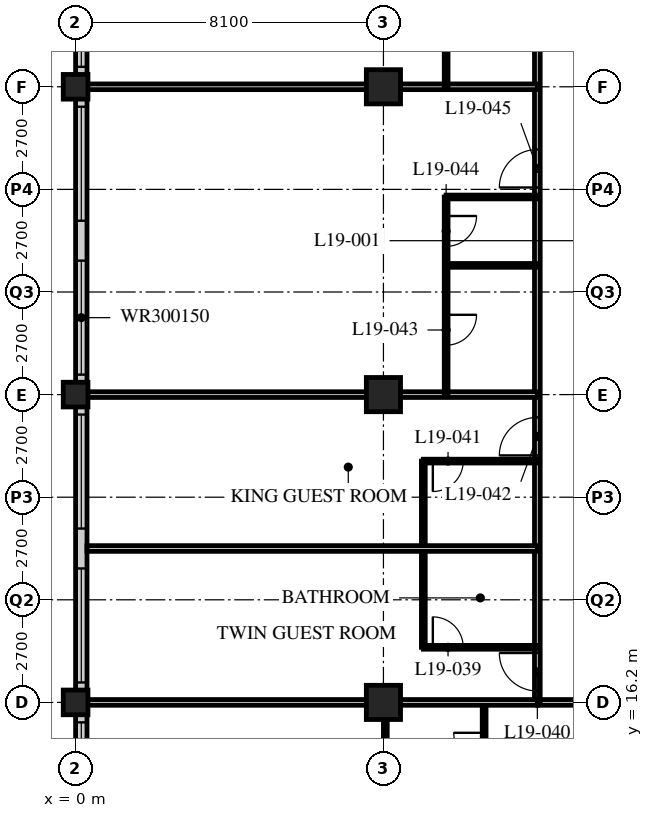
"""IFC4 building model, lengths in metres.
Left out: names, types, materials, properties, quantities, classifications, styles, units other than length and angle.
Written with IfcOpenShell. Run it as: python <this file> out.ifc"""

import sys

from ifc_helpers import new_model, si_unit, direction, frame, frame_2d, origin, origin_2d, place, context, subcontext, project, spatial, rectangle, hollow_rectangle, extrude, element, fill, save


model = new_model("IFC4")
c1 = context("Model", 3, precision=1e-05, world=origin(), true_north=direction((0.0, 1.0)))
c2 = subcontext(c1, "Body", "Model", "MODEL_VIEW")
j1 = project(units=[si_unit("LENGTHUNIT", "METRE"), si_unit("PLANEANGLEUNIT", "RADIAN")], contexts=[c1])
p1 = place(None, origin())
s1 = spatial("IfcSite", under=j1, at=p1, CompositionType="ELEMENT")
p2 = place(p1, origin())
s2 = spatial("IfcBuilding", under=s1, at=p2, CompositionType="ELEMENT")
p3 = place(p2, frame((0.0, 0.0, 77.2)))
s3 = spatial("IfcBuildingStorey", under=s2, at=p3, CompositionType="ELEMENT", Elevation=77.2)
for number, where, z_axis, x_axis in (
    (1, (0.0, 16.2, 0.0), (0.0, 0.0, 1.0), (1.0, 0.0, 0.0)),
    (2, (0.0, 24.3, 0.0), (0.0, 0.0, 1.0), (1.0, 0.0, 0.0)),
    (3, (0.0, 32.4, 0.0), (0.0, 0.0, 1.0), (1.0, 0.0, 0.0)),
):
    element("IfcColumn", number, at=place(p3, frame(where, z_axis=z_axis, x_axis=x_axis)), inside=s3, PredefinedType="COLUMN", context=c2, shape_type="SweptSolid", body=[
        extrude(hollow_rectangle(XDim=0.65, YDim=0.65, WallThickness=0.05, at=origin_2d()), origin(), (0.0, 0.0, 1.0), 3.4),
    ])
for number, where, z_axis, x_axis in (
    (4, (8.1, 16.2, 0.0), (0.0, 0.0, 1.0), (1.0, 0.0, 0.0)),
    (5, (8.1, 24.3, 0.0), (0.0, 0.0, 1.0), (1.0, 0.0, 0.0)),
    (6, (8.1, 32.4, 0.0), (0.0, 0.0, 1.0), (1.0, 0.0, 0.0)),
):
    element("IfcColumn", number, at=place(p3, frame(where, z_axis=z_axis, x_axis=x_axis)), inside=s3, PredefinedType="COLUMN", context=c2, shape_type="SweptSolid", body=[
        extrude(hollow_rectangle(XDim=0.9, YDim=0.9, WallThickness=0.09, at=origin_2d()), origin(), (0.0, 0.0, 1.0), 3.4),
    ])
p4 = place(p3, frame((0.15, 40.2, 0.0), z_axis=(0.0, 0.0, 1.0), x_axis=(0.0, -1.0, 0.0)))
e7 = element("IfcWall", 7, at=p4, inside=s3, PredefinedType="SOLIDWALL", context=c2, shape_type="SweptSolid", body=[
    extrude(rectangle(XDim=32.1, YDim=0.3, at=frame_2d((16.05, 0.0))), origin(), (0.0, 0.0, 1.0), 3.19),
])
p5 = place(p4, frame((0.225, 0.0, 0.9)))
e8 = element("IfcOpeningElement", 8, at=p5, cuts=e7, PredefinedType="OPENING", context=c2, shape_type="SweptSolid", body=[
    extrude(rectangle(XDim=3.0, YDim=1.5, at=frame_2d((1.5, 0.75))), frame((0.0, 0.16, 0.0), z_axis=(0.0, -1.0, 0.0), x_axis=(1.0, 0.0, 0.0)), (0.0, 0.0, 1.0), 0.32),
])
p6 = place(p4, frame((4.275, 0.0, 0.9)))
e9 = element("IfcOpeningElement", 9, at=p6, cuts=e7, PredefinedType="OPENING", context=c2, shape_type="SweptSolid", body=[
    extrude(rectangle(XDim=3.0, YDim=1.5, at=frame_2d((1.5, 0.75))), frame((0.0, 0.16, 0.0), z_axis=(0.0, -1.0, 0.0), x_axis=(1.0, 0.0, 0.0)), (0.0, 0.0, 1.0), 0.32),
])
p7 = place(p4, frame((8.325, 0.0, 0.9)))
e10 = element("IfcOpeningElement", 10, at=p7, cuts=e7, PredefinedType="OPENING", context=c2, shape_type="SweptSolid", body=[
    extrude(rectangle(XDim=3.0, YDim=1.5, at=frame_2d((1.5, 0.75))), frame((0.0, 0.16, 0.0), z_axis=(0.0, -1.0, 0.0), x_axis=(1.0, 0.0, 0.0)), (0.0, 0.0, 1.0), 0.32),
])
p8 = place(p4, frame((12.375, 0.0, 0.9)))
e11 = element("IfcOpeningElement", 11, at=p8, cuts=e7, PredefinedType="OPENING", context=c2, shape_type="SweptSolid", body=[
    extrude(rectangle(XDim=3.0, YDim=1.5, at=frame_2d((1.5, 0.75))), frame((0.0, 0.16, 0.0), z_axis=(0.0, -1.0, 0.0), x_axis=(1.0, 0.0, 0.0)), (0.0, 0.0, 1.0), 0.32),
])
p9 = place(p4, frame((16.425, 0.0, 0.9)))
e12 = element("IfcOpeningElement", 12, at=p9, cuts=e7, PredefinedType="OPENING", context=c2, shape_type="SweptSolid", body=[
    extrude(rectangle(XDim=3.0, YDim=1.5, at=frame_2d((1.5, 0.75))), frame((0.0, 0.16, 0.0), z_axis=(0.0, -1.0, 0.0), x_axis=(1.0, 0.0, 0.0)), (0.0, 0.0, 1.0), 0.32),
])
p10 = place(p4, frame((20.475, 0.0, 0.9)))
e13 = element("IfcOpeningElement", 13, at=p10, cuts=e7, PredefinedType="OPENING", context=c2, shape_type="SweptSolid", body=[
    extrude(rectangle(XDim=3.0, YDim=1.5, at=frame_2d((1.5, 0.75))), frame((0.0, 0.16, 0.0), z_axis=(0.0, -1.0, 0.0), x_axis=(1.0, 0.0, 0.0)), (0.0, 0.0, 1.0), 0.32),
])
p11 = place(p4, frame((24.525, 0.0, 0.9)))
e14 = element("IfcOpeningElement", 14, at=p11, cuts=e7, PredefinedType="OPENING", context=c2, shape_type="SweptSolid", body=[
    extrude(rectangle(XDim=3.0, YDim=1.5, at=frame_2d((1.5, 0.75))), frame((0.0, 0.16, 0.0), z_axis=(0.0, -1.0, 0.0), x_axis=(1.0, 0.0, 0.0)), (0.0, 0.0, 1.0), 0.32),
])
p12 = place(p4, frame((28.575, 0.0, 0.9)))
e15 = element("IfcOpeningElement", 15, at=p12, cuts=e7, PredefinedType="OPENING", context=c2, shape_type="SweptSolid", body=[
    extrude(rectangle(XDim=3.0, YDim=1.5, at=frame_2d((1.5, 0.75))), frame((0.0, 0.16, 0.0), z_axis=(0.0, -1.0, 0.0), x_axis=(1.0, 0.0, 0.0)), (0.0, 0.0, 1.0), 0.32),
])
p13 = place(p3, frame((12.15, 16.2, 0.0), z_axis=(0.0, 0.0, 1.0), x_axis=(1.0, 0.0, 0.0)))
e16 = element("IfcWall", 16, at=p13, inside=s3, PredefinedType="PARTITIONING", context=c2, shape_type="SweptSolid", body=[
    extrude(rectangle(XDim=36.45, YDim=0.15, at=frame_2d((18.225, 0.0))), origin(), (0.0, 0.0, 1.0), 2.428),
])
p14 = place(p13, frame((6.5, 0.0, 0.0)))
e17 = element("IfcOpeningElement", 17, at=p14, cuts=e16, PredefinedType="OPENING", context=c2, shape_type="SweptSolid", body=[
    extrude(rectangle(XDim=1.0, YDim=2.1, at=frame_2d((0.5, 1.05))), frame((0.0, 0.085, 0.0), z_axis=(0.0, -1.0, 0.0), x_axis=(1.0, 0.0, 0.0)), (0.0, 0.0, 1.0), 0.17),
])
p15 = place(p13, frame((8.4, 0.0, 0.0)))
e18 = element("IfcOpeningElement", 18, at=p15, cuts=e16, PredefinedType="OPENING", context=c2, shape_type="SweptSolid", body=[
    extrude(rectangle(XDim=1.0, YDim=2.1, at=frame_2d((0.5, 1.05))), frame((0.0, 0.085, 0.0), z_axis=(0.0, -1.0, 0.0), x_axis=(1.0, 0.0, 0.0)), (0.0, 0.0, 1.0), 0.17),
])
p16 = place(p13, frame((14.9, 0.0, 0.0)))
e19 = element("IfcOpeningElement", 19, at=p16, cuts=e16, PredefinedType="OPENING", context=c2, shape_type="SweptSolid", body=[
    extrude(rectangle(XDim=1.0, YDim=2.1, at=frame_2d((0.5, 1.05))), frame((0.0, 0.085, 0.0), z_axis=(0.0, -1.0, 0.0), x_axis=(1.0, 0.0, 0.0)), (0.0, 0.0, 1.0), 0.17),
])
p17 = place(p13, frame((16.5, 0.0, 0.0)))
e20 = element("IfcOpeningElement", 20, at=p17, cuts=e16, PredefinedType="OPENING", context=c2, shape_type="SweptSolid", body=[
    extrude(rectangle(XDim=1.0, YDim=2.1, at=frame_2d((0.5, 1.05))), frame((0.0, 0.085, 0.0), z_axis=(0.0, -1.0, 0.0), x_axis=(1.0, 0.0, 0.0)), (0.0, 0.0, 1.0), 0.17),
])
p18 = place(p13, frame((22.7, 0.0, 0.0)))
e21 = element("IfcOpeningElement", 21, at=p18, cuts=e16, PredefinedType="OPENING", context=c2, shape_type="SweptSolid", body=[
    extrude(rectangle(XDim=1.0, YDim=2.1, at=frame_2d((0.5, 1.05))), frame((0.0, 0.085, 0.0), z_axis=(0.0, -1.0, 0.0), x_axis=(1.0, 0.0, 0.0)), (0.0, 0.0, 1.0), 0.17),
])
p19 = place(p13, frame((24.9, 0.0, 0.0)))
e22 = element("IfcOpeningElement", 22, at=p19, cuts=e16, PredefinedType="OPENING", context=c2, shape_type="SweptSolid", body=[
    extrude(rectangle(XDim=1.0, YDim=2.1, at=frame_2d((0.5, 1.05))), frame((0.0, 0.085, 0.0), z_axis=(0.0, -1.0, 0.0), x_axis=(1.0, 0.0, 0.0)), (0.0, 0.0, 1.0), 0.17),
])
p20 = place(p13, frame((30.8, 0.0, 0.0)))
e23 = element("IfcOpeningElement", 23, at=p20, cuts=e16, PredefinedType="OPENING", context=c2, shape_type="SweptSolid", body=[
    extrude(rectangle(XDim=1.0, YDim=2.1, at=frame_2d((0.5, 1.05))), frame((0.0, 0.085, 0.0), z_axis=(0.0, -1.0, 0.0), x_axis=(1.0, 0.0, 0.0)), (0.0, 0.0, 1.0), 0.17),
])
p21 = place(p13, frame((1.525, 0.0, 0.0)))
e24 = element("IfcOpeningElement", 24, at=p21, cuts=e16, PredefinedType="OPENING", context=c2, shape_type="SweptSolid", body=[
    extrude(rectangle(XDim=1.0, YDim=2.1, at=frame_2d((0.5, 1.05))), frame((0.0, 0.085, 0.0), z_axis=(0.0, -1.0, 0.0), x_axis=(1.0, 0.0, 0.0)), (0.0, 0.0, 1.0), 0.17),
])
p22 = place(p13, frame((33.925, 0.0, 0.0)))
e25 = element("IfcOpeningElement", 25, at=p22, cuts=e16, PredefinedType="OPENING", context=c2, shape_type="SweptSolid", body=[
    extrude(rectangle(XDim=1.0, YDim=2.1, at=frame_2d((0.5, 1.05))), frame((0.0, 0.085, 0.0), z_axis=(0.0, -1.0, 0.0), x_axis=(1.0, 0.0, 0.0)), (0.0, 0.0, 1.0), 0.17),
])
p23 = place(p3, frame((12.15, 16.2, 0.0), z_axis=(0.0, 0.0, 1.0), x_axis=(0.0, 1.0, 0.0)))
e26 = element("IfcWall", 26, at=p23, inside=s3, PredefinedType="PARTITIONING", context=c2, shape_type="SweptSolid", body=[
    extrude(rectangle(XDim=26.1, YDim=0.15, at=frame_2d((13.05, 0.0))), origin(), (0.0, 0.0, 1.0), 3.19),
])
p24 = place(p23, frame((0.3, 0.0, 0.0)))
e27 = element("IfcOpeningElement", 27, at=p24, cuts=e26, PredefinedType="OPENING", context=c2, shape_type="SweptSolid", body=[
    extrude(rectangle(XDim=1.0, YDim=2.1, at=frame_2d((0.5, 1.05))), frame((0.0, 0.085, 0.0), z_axis=(0.0, -1.0, 0.0), x_axis=(1.0, 0.0, 0.0)), (0.0, 0.0, 1.0), 0.17),
])
p25 = place(p23, frame((6.5, 0.0, 0.0)))
e28 = element("IfcOpeningElement", 28, at=p25, cuts=e26, PredefinedType="OPENING", context=c2, shape_type="SweptSolid", body=[
    extrude(rectangle(XDim=1.0, YDim=2.1, at=frame_2d((0.5, 1.05))), frame((0.0, 0.085, 0.0), z_axis=(0.0, -1.0, 0.0), x_axis=(1.0, 0.0, 0.0)), (0.0, 0.0, 1.0), 0.17),
])
p26 = place(p23, frame((13.55, 0.0, 0.0)))
e29 = element("IfcOpeningElement", 29, at=p26, cuts=e26, PredefinedType="OPENING", context=c2, shape_type="SweptSolid", body=[
    extrude(rectangle(XDim=1.0, YDim=2.1, at=frame_2d((0.5, 1.05))), frame((0.0, 0.085, 0.0), z_axis=(0.0, -1.0, 0.0), x_axis=(1.0, 0.0, 0.0)), (0.0, 0.0, 1.0), 0.17),
])
p27 = place(p23, frame((21.65, 0.0, 0.0)))
e30 = element("IfcOpeningElement", 30, at=p27, cuts=e26, PredefinedType="OPENING", context=c2, shape_type="SweptSolid", body=[
    extrude(rectangle(XDim=1.0, YDim=2.1, at=frame_2d((0.5, 1.05))), frame((0.0, 0.085, 0.0), z_axis=(0.0, -1.0, 0.0), x_axis=(1.0, 0.0, 0.0)), (0.0, 0.0, 1.0), 0.17),
])
p28 = place(p3, frame((9.15, 17.65, 0.0), z_axis=(0.0, 0.0, 1.0), x_axis=(0.0, 1.0, 0.0)))
e31 = element("IfcWall", 31, at=p28, inside=s3, PredefinedType="PARTITIONING", context=c2, shape_type="SweptSolid", body=[
    extrude(rectangle(XDim=4.9, YDim=0.1, at=frame_2d((2.45, 0.0))), origin(), (0.0, 0.0, 1.0), 3.19),
])
p29 = place(p3, frame((12.15, 17.65, 0.0), z_axis=(0.0, 0.0, 1.0), x_axis=(-1.0, 0.0, 0.0)))
e32 = element("IfcWall", 32, at=p29, inside=s3, PredefinedType="PARTITIONING", context=c2, shape_type="SweptSolid", body=[
    extrude(rectangle(XDim=3.0, YDim=0.1, at=frame_2d((1.5, 0.0))), origin(), (0.0, 0.0, 1.0), 3.19),
])
p30 = place(p29, frame((1.95, 0.0, 0.0)))
e33 = element("IfcOpeningElement", 33, at=p30, cuts=e32, PredefinedType="OPENING", context=c2, shape_type="SweptSolid", body=[
    extrude(rectangle(XDim=0.8, YDim=2.1, at=frame_2d((0.4, 1.05))), frame((0.0, 0.06, 0.0), z_axis=(0.0, -1.0, 0.0), x_axis=(1.0, 0.0, 0.0)), (0.0, 0.0, 1.0), 0.12),
])
p31 = place(p3, frame((12.15, 20.25, 0.0), z_axis=(0.0, 0.0, 1.0), x_axis=(-1.0, 0.0, 0.0)))
e34 = element("IfcWall", 34, at=p31, inside=s3, PredefinedType="PARTITIONING", context=c2, shape_type="SweptSolid", body=[
    extrude(rectangle(XDim=11.85, YDim=0.15, at=frame_2d((5.925, 0.0))), origin(), (0.0, 0.0, 1.0), 3.19),
])
p32 = place(p3, frame((12.15, 22.55, 0.0), z_axis=(0.0, 0.0, 1.0), x_axis=(-1.0, 0.0, 0.0)))
e35 = element("IfcWall", 35, at=p32, inside=s3, PredefinedType="PARTITIONING", context=c2, shape_type="SweptSolid", body=[
    extrude(rectangle(XDim=3.0, YDim=0.1, at=frame_2d((1.5, 0.0))), origin(), (0.0, 0.0, 1.0), 3.19),
])
p33 = place(p32, frame((1.95, 0.0, 0.0)))
e36 = element("IfcOpeningElement", 36, at=p33, cuts=e35, PredefinedType="OPENING", context=c2, shape_type="SweptSolid", body=[
    extrude(rectangle(XDim=0.8, YDim=2.1, at=frame_2d((0.4, 1.05))), frame((0.0, 0.06, 0.0), z_axis=(0.0, -1.0, 0.0), x_axis=(1.0, 0.0, 0.0)), (0.0, 0.0, 1.0), 0.12),
])
p34 = place(p3, frame((12.15, 24.3, 0.0), z_axis=(0.0, 0.0, 1.0), x_axis=(-1.0, 0.0, 0.0)))
e37 = element("IfcWall", 37, at=p34, inside=s3, PredefinedType="PARTITIONING", context=c2, shape_type="SweptSolid", body=[
    extrude(rectangle(XDim=11.85, YDim=0.15, at=frame_2d((5.925, 0.0))), origin(), (0.0, 0.0, 1.0), 2.428),
])
p35 = place(p3, frame((9.75, 24.3, 0.0), z_axis=(0.0, 0.0, 1.0), x_axis=(0.0, 1.0, 0.0)))
e38 = element("IfcWall", 38, at=p35, inside=s3, PredefinedType="PARTITIONING", context=c2, shape_type="SweptSolid", body=[
    extrude(rectangle(XDim=5.2, YDim=0.1, at=frame_2d((2.6, 0.0))), origin(), (0.0, 0.0, 1.0), 3.19),
])
p36 = place(p35, frame((1.3, 0.0, 0.0)))
e39 = element("IfcOpeningElement", 39, at=p36, cuts=e38, PredefinedType="OPENING", context=c2, shape_type="SweptSolid", body=[
    extrude(rectangle(XDim=0.8, YDim=2.1, at=frame_2d((0.4, 1.05))), frame((0.0, 0.06, 0.0), z_axis=(0.0, -1.0, 0.0), x_axis=(1.0, 0.0, 0.0)), (0.0, 0.0, 1.0), 0.12),
])
p37 = place(p35, frame((3.9, 0.0, 0.0)))
e40 = element("IfcOpeningElement", 40, at=p37, cuts=e38, PredefinedType="OPENING", context=c2, shape_type="SweptSolid", body=[
    extrude(rectangle(XDim=0.8, YDim=2.1, at=frame_2d((0.4, 1.05))), frame((0.0, 0.06, 0.0), z_axis=(0.0, -1.0, 0.0), x_axis=(1.0, 0.0, 0.0)), (0.0, 0.0, 1.0), 0.12),
])
for number, where, z_axis, x_axis in (
    (41, (12.15, 27.7, 0.0), (0.0, 0.0, 1.0), (-1.0, 0.0, 0.0)),
    (42, (12.15, 29.5, 0.0), (0.0, 0.0, 1.0), (-1.0, 0.0, 0.0)),
):
    element("IfcWall", number, at=place(p3, frame(where, z_axis=z_axis, x_axis=x_axis)), inside=s3, PredefinedType="PARTITIONING", context=c2, shape_type="SweptSolid", body=[
        extrude(rectangle(XDim=2.4, YDim=0.1, at=frame_2d((1.2, 0.0))), origin(), (0.0, 0.0, 1.0), 3.19),
    ])
p38 = place(p3, frame((12.15, 32.4, 0.0), z_axis=(0.0, 0.0, 1.0), x_axis=(-1.0, 0.0, 0.0)))
e43 = element("IfcWall", 43, at=p38, inside=s3, PredefinedType="PARTITIONING", context=c2, shape_type="SweptSolid", body=[
    extrude(rectangle(XDim=11.85, YDim=0.15, at=frame_2d((5.925, 0.0))), origin(), (0.0, 0.0, 1.0), 2.428),
])
p39 = place(p3, frame((9.75, 32.4, 0.0), z_axis=(0.0, 0.0, 1.0), x_axis=(0.0, 1.0, 0.0)))
e44 = element("IfcWall", 44, at=p39, inside=s3, PredefinedType="PARTITIONING", context=c2, shape_type="SweptSolid", body=[
    extrude(rectangle(XDim=5.2, YDim=0.1, at=frame_2d((2.6, 0.0))), origin(), (0.0, 0.0, 1.0), 3.19),
])
p40 = place(p39, frame((1.3, 0.0, 0.0)))
e45 = element("IfcOpeningElement", 45, at=p40, cuts=e44, PredefinedType="OPENING", context=c2, shape_type="SweptSolid", body=[
    extrude(rectangle(XDim=0.8, YDim=2.1, at=frame_2d((0.4, 1.05))), frame((0.0, 0.06, 0.0), z_axis=(0.0, -1.0, 0.0), x_axis=(1.0, 0.0, 0.0)), (0.0, 0.0, 1.0), 0.12),
])
p41 = place(p39, frame((3.9, 0.0, 0.0)))
e46 = element("IfcOpeningElement", 46, at=p41, cuts=e44, PredefinedType="OPENING", context=c2, shape_type="SweptSolid", body=[
    extrude(rectangle(XDim=0.8, YDim=2.1, at=frame_2d((0.4, 1.05))), frame((0.0, 0.06, 0.0), z_axis=(0.0, -1.0, 0.0), x_axis=(1.0, 0.0, 0.0)), (0.0, 0.0, 1.0), 0.12),
])
p42 = place(p3, frame((10.75, 16.2, 0.0), z_axis=(0.0, 0.0, 1.0), x_axis=(0.0, -1.0, 0.0)))
e47 = element("IfcWall", 47, at=p42, inside=s3, PredefinedType="PARTITIONING", context=c2, shape_type="SweptSolid", body=[
    extrude(rectangle(XDim=2.4, YDim=0.1, at=frame_2d((1.2, 0.0))), origin(), (0.0, 0.0, 1.0), 3.19),
])
p43 = place(p42, frame((0.8, 0.0, 0.0)))
e48 = element("IfcOpeningElement", 48, at=p43, cuts=e47, PredefinedType="OPENING", context=c2, shape_type="SweptSolid", body=[
    extrude(rectangle(XDim=0.8, YDim=2.1, at=frame_2d((0.4, 1.05))), frame((0.0, 0.06, 0.0), z_axis=(0.0, -1.0, 0.0), x_axis=(1.0, 0.0, 0.0)), (0.0, 0.0, 1.0), 0.12),
])
p44 = place(p3, frame((8.15, 16.2, 0.0), z_axis=(0.0, 0.0, 1.0), x_axis=(0.0, -1.0, 0.0)))
e49 = element("IfcWall", 49, at=p44, inside=s3, PredefinedType="PARTITIONING", context=c2, shape_type="SweptSolid", body=[
    extrude(rectangle(XDim=2.4, YDim=0.1, at=frame_2d((1.2, 0.0))), origin(), (0.0, 0.0, 1.0), 2.428),
])
p45 = place(p3, frame((0.3, 16.2, 0.0), z_axis=(0.0, 0.0, 1.0), x_axis=(1.0, 0.0, 0.0)))
e50 = element("IfcWall", 50, at=p45, inside=s3, PredefinedType="PARTITIONING", context=c2, shape_type="SweptSolid", body=[
    extrude(rectangle(XDim=11.85, YDim=0.15, at=frame_2d((5.925, 0.0))), origin(), (0.0, 0.0, 1.0), 2.428),
])
p46 = place(p6, origin())
e51 = element("IfcWindow", 51, at=p46, inside=s3, PartitioningType="SINGLE_PANEL", PredefinedType="WINDOW", context=c2, shape_type="SweptSolid", body=[
    extrude(rectangle(XDim=3.0, YDim=1.5, at=frame_2d((1.5, 0.75))), frame((0.0, 0.03, 0.0), z_axis=(0.0, -1.0, 0.0), x_axis=(1.0, 0.0, 0.0)), (0.0, 0.0, 1.0), 0.06),
])
fill(e9, e51)
p47 = place(p7, origin())
e52 = element("IfcWindow", 52, at=p47, inside=s3, PartitioningType="SINGLE_PANEL", PredefinedType="WINDOW", context=c2, shape_type="SweptSolid", body=[
    extrude(rectangle(XDim=3.0, YDim=1.5, at=frame_2d((1.5, 0.75))), frame((0.0, 0.03, 0.0), z_axis=(0.0, -1.0, 0.0), x_axis=(1.0, 0.0, 0.0)), (0.0, 0.0, 1.0), 0.06),
])
fill(e10, e52)
p48 = place(p8, origin())
e53 = element("IfcWindow", 53, at=p48, inside=s3, PartitioningType="SINGLE_PANEL", PredefinedType="WINDOW", context=c2, shape_type="SweptSolid", body=[
    extrude(rectangle(XDim=3.0, YDim=1.5, at=frame_2d((1.5, 0.75))), frame((0.0, 0.03, 0.0), z_axis=(0.0, -1.0, 0.0), x_axis=(1.0, 0.0, 0.0)), (0.0, 0.0, 1.0), 0.06),
])
fill(e11, e53)
p49 = place(p9, origin())
e54 = element("IfcWindow", 54, at=p49, inside=s3, PartitioningType="SINGLE_PANEL", PredefinedType="WINDOW", context=c2, shape_type="SweptSolid", body=[
    extrude(rectangle(XDim=3.0, YDim=1.5, at=frame_2d((1.5, 0.75))), frame((0.0, 0.03, 0.0), z_axis=(0.0, -1.0, 0.0), x_axis=(1.0, 0.0, 0.0)), (0.0, 0.0, 1.0), 0.06),
])
fill(e12, e54)
p50 = place(p10, origin())
e55 = element("IfcWindow", 55, at=p50, inside=s3, PartitioningType="SINGLE_PANEL", PredefinedType="WINDOW", context=c2, shape_type="SweptSolid", body=[
    extrude(rectangle(XDim=3.0, YDim=1.5, at=frame_2d((1.5, 0.75))), frame((0.0, 0.03, 0.0), z_axis=(0.0, -1.0, 0.0), x_axis=(1.0, 0.0, 0.0)), (0.0, 0.0, 1.0), 0.06),
])
fill(e13, e55)
p51 = place(p11, origin())
e56 = element("IfcWindow", 56, at=p51, inside=s3, PartitioningType="SINGLE_PANEL", PredefinedType="WINDOW", context=c2, shape_type="SweptSolid", body=[
    extrude(rectangle(XDim=3.0, YDim=1.5, at=frame_2d((1.5, 0.75))), frame((0.0, 0.03, 0.0), z_axis=(0.0, -1.0, 0.0), x_axis=(1.0, 0.0, 0.0)), (0.0, 0.0, 1.0), 0.06),
])
fill(e14, e56)
p52 = place(p30, origin())
e57 = element("IfcDoor", 57, at=p52, inside=s3, OperationType="SINGLE_SWING_LEFT", PredefinedType="DOOR", context=c2, shape_type="SweptSolid", body=[
    extrude(rectangle(XDim=0.8, YDim=2.1, at=frame_2d((0.4, 1.05))), frame((0.0, 0.025, 0.0), z_axis=(0.0, -1.0, 0.0), x_axis=(1.0, 0.0, 0.0)), (0.0, 0.0, 1.0), 0.05),
])
fill(e33, e57)
p53 = place(p24, origin())
e58 = element("IfcDoor", 58, at=p53, inside=s3, OperationType="SINGLE_SWING_RIGHT", PredefinedType="DOOR", context=c2, shape_type="SweptSolid", body=[
    extrude(rectangle(XDim=1.0, YDim=2.1, at=frame_2d((0.5, 1.05))), frame((0.0, 0.025, 0.0), z_axis=(0.0, -1.0, 0.0), x_axis=(1.0, 0.0, 0.0)), (0.0, 0.0, 1.0), 0.05),
])
fill(e27, e58)
p54 = place(p33, origin())
e59 = element("IfcDoor", 59, at=p54, inside=s3, OperationType="SINGLE_SWING_RIGHT", PredefinedType="DOOR", context=c2, shape_type="SweptSolid", body=[
    extrude(rectangle(XDim=0.8, YDim=2.1, at=frame_2d((0.4, 1.05))), frame((0.0, 0.025, 0.0), z_axis=(0.0, -1.0, 0.0), x_axis=(1.0, 0.0, 0.0)), (0.0, 0.0, 1.0), 0.05),
])
fill(e36, e59)
p55 = place(p25, origin())
e60 = element("IfcDoor", 60, at=p55, inside=s3, OperationType="SINGLE_SWING_LEFT", PredefinedType="DOOR", context=c2, shape_type="SweptSolid", body=[
    extrude(rectangle(XDim=1.0, YDim=2.1, at=frame_2d((0.5, 1.05))), frame((0.0, 0.025, 0.0), z_axis=(0.0, -1.0, 0.0), x_axis=(1.0, 0.0, 0.0)), (0.0, 0.0, 1.0), 0.05),
])
fill(e28, e60)
p56 = place(p36, origin())
e61 = element("IfcDoor", 61, at=p56, inside=s3, OperationType="SINGLE_SWING_LEFT", PredefinedType="DOOR", context=c2, shape_type="SweptSolid", body=[
    extrude(rectangle(XDim=0.8, YDim=2.1, at=frame_2d((0.4, 1.05))), frame((0.0, 0.025, 0.0), z_axis=(0.0, -1.0, 0.0), x_axis=(1.0, 0.0, 0.0)), (0.0, 0.0, 1.0), 0.05),
])
fill(e39, e61)
p57 = place(p37, origin())
e62 = element("IfcDoor", 62, at=p57, inside=s3, OperationType="SINGLE_SWING_LEFT", PredefinedType="DOOR", context=c2, shape_type="SweptSolid", body=[
    extrude(rectangle(XDim=0.8, YDim=2.1, at=frame_2d((0.4, 1.05))), frame((0.0, 0.025, 0.0), z_axis=(0.0, -1.0, 0.0), x_axis=(1.0, 0.0, 0.0)), (0.0, 0.0, 1.0), 0.05),
])
fill(e40, e62)
p58 = place(p26, origin())
e63 = element("IfcDoor", 63, at=p58, inside=s3, OperationType="SINGLE_SWING_LEFT", PredefinedType="DOOR", context=c2, shape_type="SweptSolid", body=[
    extrude(rectangle(XDim=1.0, YDim=2.1, at=frame_2d((0.5, 1.05))), frame((0.0, 0.025, 0.0), z_axis=(0.0, -1.0, 0.0), x_axis=(1.0, 0.0, 0.0)), (0.0, 0.0, 1.0), 0.05),
])
fill(e29, e63)
p59 = place(p43, origin())
e64 = element("IfcDoor", 64, at=p59, inside=s3, OperationType="SINGLE_SWING_RIGHT", PredefinedType="DOOR", context=c2, shape_type="SweptSolid", body=[
    extrude(rectangle(XDim=0.8, YDim=2.1, at=frame_2d((0.4, 1.05))), frame((0.0, 0.025, 0.0), z_axis=(0.0, -1.0, 0.0), x_axis=(1.0, 0.0, 0.0)), (0.0, 0.0, 1.0), 0.05),
])
fill(e48, e64)
save(model, sys.argv[1])
